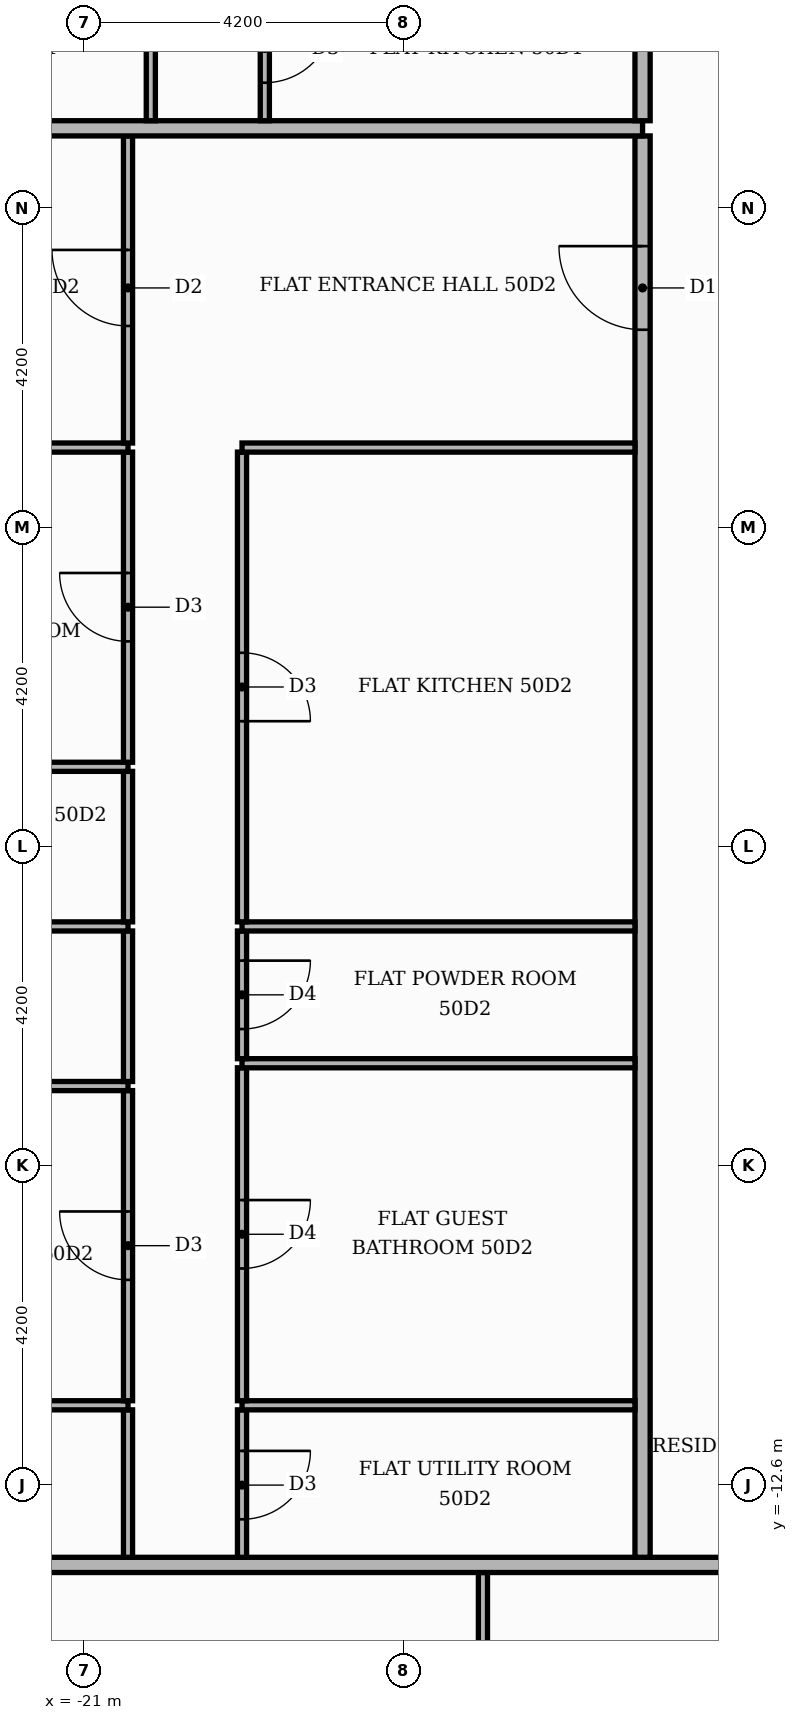
"""IFC4 building model, lengths in metres.
Left out: names, types, materials, properties, quantities, classifications, styles, units other than length and angle.
Written with IfcOpenShell. Run it as: python <this file> out.ifc"""

import sys

from ifc_helpers import new_model, si_unit, direction, frame, frame_2d, origin, place, context, subcontext, project, spatial, rectangle, extrude, element, fill, save


model = new_model("IFC4")
c1 = context("Model", 3, precision=1e-05, world=origin(), true_north=direction((0.0, 1.0)))
c2 = subcontext(c1, "Body", "Model", "MODEL_VIEW")
j1 = project(units=[si_unit("LENGTHUNIT", "METRE"), si_unit("PLANEANGLEUNIT", "RADIAN")], contexts=[c1])
p1 = place(None, origin())
s1 = spatial("IfcSite", under=j1, at=p1, CompositionType="ELEMENT")
p2 = place(p1, origin())
s2 = spatial("IfcBuilding", under=s1, at=p2, CompositionType="ELEMENT")
p3 = place(p2, frame((0.0, 0.0, 211.8)))
s3 = spatial("IfcBuildingStorey", under=s2, at=p3, CompositionType="ELEMENT", Elevation=211.8)
p4 = place(p3, frame((-15.75, -20.36, 0.0), z_axis=(0.0, 0.0, 1.0), x_axis=(0.0, 1.0, 0.0)))
e1 = element("IfcWall", 1, at=p4, inside=s3, PredefinedType="PARTITIONING", context=c2, shape_type="SweptSolid", body=[
    extrude(rectangle(XDim=6.61, YDim=0.12, at=frame_2d((3.305, 0.0))), origin(), (0.0, 0.0, 1.0), 3.48),
])
p5 = place(p4, frame((2.875, 0.0, 0.0)))
e2 = element("IfcOpeningElement", 2, at=p5, cuts=e1, PredefinedType="OPENING", context=c2, shape_type="SweptSolid", body=[
    extrude(rectangle(XDim=0.9, YDim=2.1, at=frame_2d((0.45, 1.05))), frame((0.0, 0.07, 0.0), z_axis=(0.0, -1.0, 0.0), x_axis=(1.0, 0.0, 0.0)), (0.0, 0.0, 1.0), 0.14),
])
p6 = place(p3, frame((-25.42, -13.65, 0.0), z_axis=(0.0, 0.0, 1.0), x_axis=(1.0, 0.0, 0.0)))
e3 = element("IfcWall", 3, at=p6, inside=s3, PredefinedType="PARTITIONING", context=c2, shape_type="SweptSolid", body=[
    extrude(rectangle(XDim=39.07, YDim=0.2, at=frame_2d((19.535, 0.0))), origin(), (0.0, 0.0, 1.0), 3.48),
])
p7 = place(p6, frame((13.32, 0.0, 0.0)))
e4 = element("IfcOpeningElement", 4, at=p7, cuts=e3, PredefinedType="OPENING", context=c2, shape_type="SweptSolid", body=[
    extrude(rectangle(XDim=1.1, YDim=2.4, at=frame_2d((0.55, 1.2))), frame((0.0, 0.11, 0.0), z_axis=(0.0, -1.0, 0.0), x_axis=(1.0, 0.0, 0.0)), (0.0, 0.0, 1.0), 0.22),
])
p8 = place(p3, frame((-20.42, -13.55, 0.0), z_axis=(0.0, 0.0, 1.0), x_axis=(0.0, 1.0, 0.0)))
e5 = element("IfcWall", 5, at=p8, inside=s3, PredefinedType="PARTITIONING", context=c2, shape_type="SweptSolid", body=[
    extrude(rectangle(XDim=1.94, YDim=0.12, at=frame_2d((0.97, 0.0))), origin(), (0.0, 0.0, 1.0), 3.48),
])
p9 = place(p3, frame((-18.92, -13.55, 0.0), z_axis=(0.0, 0.0, 1.0), x_axis=(0.0, 1.0, 0.0)))
e6 = element("IfcWall", 6, at=p9, inside=s3, PredefinedType="PARTITIONING", context=c2, shape_type="SweptSolid", body=[
    extrude(rectangle(XDim=1.94, YDim=0.12, at=frame_2d((0.97, 0.0))), origin(), (0.0, 0.0, 1.0), 3.48),
])
p10 = place(p9, frame((0.5, 0.0, 0.0)))
e7 = element("IfcOpeningElement", 7, at=p10, cuts=e6, PredefinedType="OPENING", context=c2, shape_type="SweptSolid", body=[
    extrude(rectangle(XDim=0.9, YDim=2.1, at=frame_2d((0.45, 1.05))), frame((0.0, 0.07, 0.0), z_axis=(0.0, -1.0, 0.0), x_axis=(1.0, 0.0, 0.0)), (0.0, 0.0, 1.0), 0.14),
])
p11 = place(p3, frame((-13.65, -13.55, 0.0), z_axis=(0.0, 0.0, 1.0), x_axis=(0.0, 1.0, 0.0)))
e8 = element("IfcWall", 8, at=p11, inside=s3, PredefinedType="PARTITIONING", context=c2, shape_type="SweptSolid", body=[
    extrude(rectangle(XDim=18.7, YDim=0.2, at=frame_2d((9.35, 0.0))), origin(), (0.0, 0.0, 1.0), 3.48),
])
p12 = place(p11, frame((16.15, 0.0, 0.0)))
e9 = element("IfcOpeningElement", 9, at=p12, cuts=e8, PredefinedType="OPENING", context=c2, shape_type="SweptSolid", body=[
    extrude(rectangle(XDim=1.1, YDim=2.4, at=frame_2d((0.55, 1.2))), frame((0.0, 0.11, 0.0), z_axis=(0.0, -1.0, 0.0), x_axis=(1.0, 0.0, 0.0)), (0.0, 0.0, 1.0), 0.22),
])
p13 = place(p3, frame((-25.42, -11.55, 0.0), z_axis=(0.0, 0.0, 1.0), x_axis=(1.0, 0.0, 0.0)))
e10 = element("IfcWall", 10, at=p13, inside=s3, PredefinedType="PARTITIONING", context=c2, shape_type="SweptSolid", body=[
    extrude(rectangle(XDim=5.0, YDim=0.12, at=frame_2d((2.5, 0.0))), origin(), (0.0, 0.0, 1.0), 3.48),
])
p14 = place(p13, frame((1.9, 0.0, 0.0)))
e11 = element("IfcOpeningElement", 11, at=p14, cuts=e10, PredefinedType="OPENING", context=c2, shape_type="SweptSolid", body=[
    extrude(rectangle(XDim=0.9, YDim=2.1, at=frame_2d((0.45, 1.05))), frame((0.0, 0.07, 0.0), z_axis=(0.0, -1.0, 0.0), x_axis=(1.0, 0.0, 0.0)), (0.0, 0.0, 1.0), 0.14),
])
p15 = place(p3, frame((-18.92, -11.55, 0.0), z_axis=(0.0, 0.0, 1.0), x_axis=(1.0, 0.0, 0.0)))
e12 = element("IfcWall", 12, at=p15, inside=s3, PredefinedType="PARTITIONING", context=c2, shape_type="SweptSolid", body=[
    extrude(rectangle(XDim=5.17, YDim=0.12, at=frame_2d((2.585, 0.0))), origin(), (0.0, 0.0, 1.0), 3.48),
])
p16 = place(p3, frame((-20.42, -11.49, 0.0), z_axis=(0.0, 0.0, 1.0), x_axis=(0.0, 1.0, 0.0)))
e13 = element("IfcWall", 13, at=p16, inside=s3, PredefinedType="PARTITIONING", context=c2, shape_type="SweptSolid", body=[
    extrude(rectangle(XDim=4.08, YDim=0.12, at=frame_2d((2.04, 0.0))), origin(), (0.0, 0.0, 1.0), 3.48),
])
p17 = place(p16, frame((1.59, 0.0, 0.0)))
e14 = element("IfcOpeningElement", 14, at=p17, cuts=e13, PredefinedType="OPENING", context=c2, shape_type="SweptSolid", body=[
    extrude(rectangle(XDim=0.9, YDim=2.1, at=frame_2d((0.45, 1.05))), frame((0.0, 0.07, 0.0), z_axis=(0.0, -1.0, 0.0), x_axis=(1.0, 0.0, 0.0)), (0.0, 0.0, 1.0), 0.14),
])
p18 = place(p3, frame((-18.92, -11.49, 0.0), z_axis=(0.0, 0.0, 1.0), x_axis=(0.0, 1.0, 0.0)))
e15 = element("IfcWall", 15, at=p18, inside=s3, PredefinedType="PARTITIONING", context=c2, shape_type="SweptSolid", body=[
    extrude(rectangle(XDim=4.38, YDim=0.12, at=frame_2d((2.19, 0.0))), origin(), (0.0, 0.0, 1.0), 3.48),
])
p19 = place(p18, frame((1.74, 0.0, 0.0)))
e16 = element("IfcOpeningElement", 16, at=p19, cuts=e15, PredefinedType="OPENING", context=c2, shape_type="SweptSolid", body=[
    extrude(rectangle(XDim=0.9, YDim=2.1, at=frame_2d((0.45, 1.05))), frame((0.0, 0.07, 0.0), z_axis=(0.0, -1.0, 0.0), x_axis=(1.0, 0.0, 0.0)), (0.0, 0.0, 1.0), 0.14),
])
p20 = place(p3, frame((-25.42, -7.35, 0.0), z_axis=(0.0, 0.0, 1.0), x_axis=(1.0, 0.0, 0.0)))
e17 = element("IfcWall", 17, at=p20, inside=s3, PredefinedType="PARTITIONING", context=c2, shape_type="SweptSolid", body=[
    extrude(rectangle(XDim=5.0, YDim=0.12, at=frame_2d((2.5, 0.0))), origin(), (0.0, 0.0, 1.0), 3.48),
])
p21 = place(p3, frame((-20.42, -7.29, 0.0), z_axis=(0.0, 0.0, 1.0), x_axis=(0.0, 1.0, 0.0)))
e18 = element("IfcWall", 18, at=p21, inside=s3, PredefinedType="PARTITIONING", context=c2, shape_type="SweptSolid", body=[
    extrude(rectangle(XDim=1.98, YDim=0.12, at=frame_2d((0.99, 0.0))), origin(), (0.0, 0.0, 1.0), 3.48),
])
p22 = place(p3, frame((-18.92, -7.05, 0.0), z_axis=(0.0, 0.0, 1.0), x_axis=(1.0, 0.0, 0.0)))
e19 = element("IfcWall", 19, at=p22, inside=s3, PredefinedType="PARTITIONING", context=c2, shape_type="SweptSolid", body=[
    extrude(rectangle(XDim=5.17, YDim=0.12, at=frame_2d((2.585, 0.0))), origin(), (0.0, 0.0, 1.0), 3.48),
])
p23 = place(p3, frame((-18.92, -6.99, 0.0), z_axis=(0.0, 0.0, 1.0), x_axis=(0.0, 1.0, 0.0)))
e20 = element("IfcWall", 20, at=p23, inside=s3, PredefinedType="PARTITIONING", context=c2, shape_type="SweptSolid", body=[
    extrude(rectangle(XDim=1.68, YDim=0.12, at=frame_2d((0.84, 0.0))), origin(), (0.0, 0.0, 1.0), 3.48),
])
p24 = place(p23, frame((0.39, 0.0, 0.0)))
e21 = element("IfcOpeningElement", 21, at=p24, cuts=e20, PredefinedType="OPENING", context=c2, shape_type="SweptSolid", body=[
    extrude(rectangle(XDim=0.9, YDim=2.1, at=frame_2d((0.45, 1.05))), frame((0.0, 0.07, 0.0), z_axis=(0.0, -1.0, 0.0), x_axis=(1.0, 0.0, 0.0)), (0.0, 0.0, 1.0), 0.14),
])
p25 = place(p3, frame((-25.42, -5.25, 0.0), z_axis=(0.0, 0.0, 1.0), x_axis=(1.0, 0.0, 0.0)))
e22 = element("IfcWall", 22, at=p25, inside=s3, PredefinedType="PARTITIONING", context=c2, shape_type="SweptSolid", body=[
    extrude(rectangle(XDim=5.0, YDim=0.12, at=frame_2d((2.5, 0.0))), origin(), (0.0, 0.0, 1.0), 3.48),
])
p26 = place(p25, frame((1.9, 0.0, 0.0)))
e23 = element("IfcOpeningElement", 23, at=p26, cuts=e22, PredefinedType="OPENING", context=c2, shape_type="SweptSolid", body=[
    extrude(rectangle(XDim=0.9, YDim=2.1, at=frame_2d((0.45, 1.05))), frame((0.0, 0.07, 0.0), z_axis=(0.0, -1.0, 0.0), x_axis=(1.0, 0.0, 0.0)), (0.0, 0.0, 1.0), 0.14),
])
p27 = place(p3, frame((-18.92, -5.25, 0.0), z_axis=(0.0, 0.0, 1.0), x_axis=(1.0, 0.0, 0.0)))
e24 = element("IfcWall", 24, at=p27, inside=s3, PredefinedType="PARTITIONING", context=c2, shape_type="SweptSolid", body=[
    extrude(rectangle(XDim=5.17, YDim=0.12, at=frame_2d((2.585, 0.0))), origin(), (0.0, 0.0, 1.0), 3.48),
])
p28 = place(p3, frame((-20.42, -5.19, 0.0), z_axis=(0.0, 0.0, 1.0), x_axis=(0.0, 1.0, 0.0)))
e25 = element("IfcWall", 25, at=p28, inside=s3, PredefinedType="PARTITIONING", context=c2, shape_type="SweptSolid", body=[
    extrude(rectangle(XDim=1.98, YDim=0.12, at=frame_2d((0.99, 0.0))), origin(), (0.0, 0.0, 1.0), 3.48),
])
p29 = place(p3, frame((-18.92, -5.19, 0.0), z_axis=(0.0, 0.0, 1.0), x_axis=(0.0, 1.0, 0.0)))
e26 = element("IfcWall", 26, at=p29, inside=s3, PredefinedType="PARTITIONING", context=c2, shape_type="SweptSolid", body=[
    extrude(rectangle(XDim=6.18, YDim=0.12, at=frame_2d((3.09, 0.0))), origin(), (0.0, 0.0, 1.0), 3.48),
])
p30 = place(p29, frame((2.64, 0.0, 0.0)))
e27 = element("IfcOpeningElement", 27, at=p30, cuts=e26, PredefinedType="OPENING", context=c2, shape_type="SweptSolid", body=[
    extrude(rectangle(XDim=0.9, YDim=2.1, at=frame_2d((0.45, 1.05))), frame((0.0, 0.07, 0.0), z_axis=(0.0, -1.0, 0.0), x_axis=(1.0, 0.0, 0.0)), (0.0, 0.0, 1.0), 0.14),
])
p31 = place(p3, frame((-25.42, -3.15, 0.0), z_axis=(0.0, 0.0, 1.0), x_axis=(1.0, 0.0, 0.0)))
e28 = element("IfcWall", 28, at=p31, inside=s3, PredefinedType="PARTITIONING", context=c2, shape_type="SweptSolid", body=[
    extrude(rectangle(XDim=5.0, YDim=0.12, at=frame_2d((2.5, 0.0))), origin(), (0.0, 0.0, 1.0), 3.48),
])
p32 = place(p31, frame((1.9, 0.0, 0.0)))
e29 = element("IfcOpeningElement", 29, at=p32, cuts=e28, PredefinedType="OPENING", context=c2, shape_type="SweptSolid", body=[
    extrude(rectangle(XDim=0.9, YDim=2.1, at=frame_2d((0.45, 1.05))), frame((0.0, 0.07, 0.0), z_axis=(0.0, -1.0, 0.0), x_axis=(1.0, 0.0, 0.0)), (0.0, 0.0, 1.0), 0.14),
])
p33 = place(p3, frame((-20.42, -3.09, 0.0), z_axis=(0.0, 0.0, 1.0), x_axis=(0.0, 1.0, 0.0)))
e30 = element("IfcWall", 30, at=p33, inside=s3, PredefinedType="PARTITIONING", context=c2, shape_type="SweptSolid", body=[
    extrude(rectangle(XDim=4.08, YDim=0.12, at=frame_2d((2.04, 0.0))), origin(), (0.0, 0.0, 1.0), 3.48),
])
p34 = place(p33, frame((1.59, 0.0, 0.0)))
e31 = element("IfcOpeningElement", 31, at=p34, cuts=e30, PredefinedType="OPENING", context=c2, shape_type="SweptSolid", body=[
    extrude(rectangle(XDim=0.9, YDim=2.1, at=frame_2d((0.45, 1.05))), frame((0.0, 0.07, 0.0), z_axis=(0.0, -1.0, 0.0), x_axis=(1.0, 0.0, 0.0)), (0.0, 0.0, 1.0), 0.14),
])
p35 = place(p3, frame((-25.42, 1.05, 0.0), z_axis=(0.0, 0.0, 1.0), x_axis=(1.0, 0.0, 0.0)))
e32 = element("IfcWall", 32, at=p35, inside=s3, PredefinedType="PARTITIONING", context=c2, shape_type="SweptSolid", body=[
    extrude(rectangle(XDim=5.0, YDim=0.12, at=frame_2d((2.5, 0.0))), origin(), (0.0, 0.0, 1.0), 3.48),
])
p36 = place(p3, frame((-18.92, 1.05, 0.0), z_axis=(0.0, 0.0, 1.0), x_axis=(1.0, 0.0, 0.0)))
e33 = element("IfcWall", 33, at=p36, inside=s3, PredefinedType="PARTITIONING", context=c2, shape_type="SweptSolid", body=[
    extrude(rectangle(XDim=5.17, YDim=0.12, at=frame_2d((2.585, 0.0))), origin(), (0.0, 0.0, 1.0), 3.48),
])
p37 = place(p3, frame((-20.42, 1.11, 0.0), z_axis=(0.0, 0.0, 1.0), x_axis=(0.0, 1.0, 0.0)))
e34 = element("IfcWall", 34, at=p37, inside=s3, PredefinedType="PARTITIONING", context=c2, shape_type="SweptSolid", body=[
    extrude(rectangle(XDim=4.04, YDim=0.12, at=frame_2d((2.02, 0.0))), origin(), (0.0, 0.0, 1.0), 3.48),
])
p38 = place(p37, frame((1.54, 0.0, 0.0)))
e35 = element("IfcOpeningElement", 35, at=p38, cuts=e34, PredefinedType="OPENING", context=c2, shape_type="SweptSolid", body=[
    extrude(rectangle(XDim=1.0, YDim=2.1, at=frame_2d((0.5, 1.05))), frame((0.0, 0.07, 0.0), z_axis=(0.0, -1.0, 0.0), x_axis=(1.0, 0.0, 0.0)), (0.0, 0.0, 1.0), 0.14),
])
p39 = place(p3, frame((-25.42, 5.25, 0.0), z_axis=(0.0, 0.0, 1.0), x_axis=(1.0, 0.0, 0.0)))
e36 = element("IfcWall", 36, at=p39, inside=s3, PredefinedType="PARTITIONING", context=c2, shape_type="SweptSolid", body=[
    extrude(rectangle(XDim=11.77, YDim=0.2, at=frame_2d((5.885, 0.0))), origin(), (0.0, 0.0, 1.0), 3.48),
])
p40 = place(p3, frame((-20.12, 5.35, 0.0), z_axis=(0.0, 0.0, 1.0), x_axis=(0.0, 1.0, 0.0)))
e37 = element("IfcWall", 37, at=p40, inside=s3, PredefinedType="PARTITIONING", context=c2, shape_type="SweptSolid", body=[
    extrude(rectangle(XDim=1.94, YDim=0.12, at=frame_2d((0.97, 0.0))), origin(), (0.0, 0.0, 1.0), 3.48),
])
p41 = place(p3, frame((-18.62, 5.35, 0.0), z_axis=(0.0, 0.0, 1.0), x_axis=(0.0, 1.0, 0.0)))
e38 = element("IfcWall", 38, at=p41, inside=s3, PredefinedType="PARTITIONING", context=c2, shape_type="SweptSolid", body=[
    extrude(rectangle(XDim=1.94, YDim=0.12, at=frame_2d((0.97, 0.0))), origin(), (0.0, 0.0, 1.0), 3.48),
])
p42 = place(p41, frame((0.5, 0.0, 0.0)))
e39 = element("IfcOpeningElement", 39, at=p42, cuts=e38, PredefinedType="OPENING", context=c2, shape_type="SweptSolid", body=[
    extrude(rectangle(XDim=0.9, YDim=2.1, at=frame_2d((0.45, 1.05))), frame((0.0, 0.07, 0.0), z_axis=(0.0, -1.0, 0.0), x_axis=(1.0, 0.0, 0.0)), (0.0, 0.0, 1.0), 0.14),
])
p43 = place(p3, frame((-13.65, 5.35, 0.0), z_axis=(0.0, 0.0, 1.0), x_axis=(0.0, 1.0, 0.0)))
e40 = element("IfcWall", 40, at=p43, inside=s3, PredefinedType="PARTITIONING", context=c2, shape_type="SweptSolid", body=[
    extrude(rectangle(XDim=8.2, YDim=0.2, at=frame_2d((4.1, 0.0))), origin(), (0.0, 0.0, 1.0), 3.48),
])
p44 = place(p43, frame((5.65, 0.0, 0.0)))
e41 = element("IfcOpeningElement", 41, at=p44, cuts=e40, PredefinedType="OPENING", context=c2, shape_type="SweptSolid", body=[
    extrude(rectangle(XDim=1.1, YDim=2.4, at=frame_2d((0.55, 1.2))), frame((0.0, 0.11, 0.0), z_axis=(0.0, -1.0, 0.0), x_axis=(1.0, 0.0, 0.0)), (0.0, 0.0, 1.0), 0.22),
])
p45 = place(p42, frame((0.9, 0.0, 0.0), z_axis=(0.0, 0.0, 1.0), x_axis=(-1.0, 0.0, 0.0)))
e42 = element("IfcDoor", 42, at=p45, inside=s3, OperationType="SINGLE_SWING_RIGHT", PredefinedType="DOOR", context=c2, shape_type="SweptSolid", body=[
    extrude(rectangle(XDim=0.9, YDim=2.1, at=frame_2d((0.45, 1.05))), frame((0.0, 0.025, 0.0), z_axis=(0.0, -1.0, 0.0), x_axis=(1.0, 0.0, 0.0)), (0.0, 0.0, 1.0), 0.05),
])
fill(e39, e42)
p46 = place(p12, origin())
e43 = element("IfcDoor", 43, at=p46, inside=s3, OperationType="SINGLE_SWING_RIGHT", PredefinedType="DOOR", context=c2, shape_type="SweptSolid", body=[
    extrude(rectangle(XDim=1.1, YDim=2.4, at=frame_2d((0.55, 1.2))), frame((0.0, 0.025, 0.0), z_axis=(0.0, -1.0, 0.0), x_axis=(1.0, 0.0, 0.0)), (0.0, 0.0, 1.0), 0.05),
])
fill(e9, e43)
p47 = place(p30, frame((0.9, 0.0, 0.0), z_axis=(0.0, 0.0, 1.0), x_axis=(-1.0, 0.0, 0.0)))
e44 = element("IfcDoor", 44, at=p47, inside=s3, OperationType="SINGLE_SWING_LEFT", PredefinedType="DOOR", context=c2, shape_type="SweptSolid", body=[
    extrude(rectangle(XDim=0.9, YDim=2.1, at=frame_2d((0.45, 1.05))), frame((0.0, 0.025, 0.0), z_axis=(0.0, -1.0, 0.0), x_axis=(1.0, 0.0, 0.0)), (0.0, 0.0, 1.0), 0.05),
])
fill(e27, e44)
p48 = place(p24, frame((0.9, 0.0, 0.0), z_axis=(0.0, 0.0, 1.0), x_axis=(-1.0, 0.0, 0.0)))
e45 = element("IfcDoor", 45, at=p48, inside=s3, OperationType="SINGLE_SWING_RIGHT", PredefinedType="DOOR", context=c2, shape_type="SweptSolid", body=[
    extrude(rectangle(XDim=0.9, YDim=2.1, at=frame_2d((0.45, 1.05))), frame((0.0, 0.025, 0.0), z_axis=(0.0, -1.0, 0.0), x_axis=(1.0, 0.0, 0.0)), (0.0, 0.0, 1.0), 0.05),
])
fill(e21, e45)
p49 = place(p19, frame((0.9, 0.0, 0.0), z_axis=(0.0, 0.0, 1.0), x_axis=(-1.0, 0.0, 0.0)))
e46 = element("IfcDoor", 46, at=p49, inside=s3, OperationType="SINGLE_SWING_RIGHT", PredefinedType="DOOR", context=c2, shape_type="SweptSolid", body=[
    extrude(rectangle(XDim=0.9, YDim=2.1, at=frame_2d((0.45, 1.05))), frame((0.0, 0.025, 0.0), z_axis=(0.0, -1.0, 0.0), x_axis=(1.0, 0.0, 0.0)), (0.0, 0.0, 1.0), 0.05),
])
fill(e16, e46)
p50 = place(p10, frame((0.9, 0.0, 0.0), z_axis=(0.0, 0.0, 1.0), x_axis=(-1.0, 0.0, 0.0)))
e47 = element("IfcDoor", 47, at=p50, inside=s3, OperationType="SINGLE_SWING_RIGHT", PredefinedType="DOOR", context=c2, shape_type="SweptSolid", body=[
    extrude(rectangle(XDim=0.9, YDim=2.1, at=frame_2d((0.45, 1.05))), frame((0.0, 0.025, 0.0), z_axis=(0.0, -1.0, 0.0), x_axis=(1.0, 0.0, 0.0)), (0.0, 0.0, 1.0), 0.05),
])
fill(e7, e47)
p51 = place(p38, origin())
e48 = element("IfcDoor", 48, at=p51, inside=s3, OperationType="SINGLE_SWING_RIGHT", PredefinedType="DOOR", context=c2, shape_type="SweptSolid", body=[
    extrude(rectangle(XDim=1.0, YDim=2.1, at=frame_2d((0.5, 1.05))), frame((0.0, 0.025, 0.0), z_axis=(0.0, -1.0, 0.0), x_axis=(1.0, 0.0, 0.0)), (0.0, 0.0, 1.0), 0.05),
])
fill(e35, e48)
p52 = place(p34, origin())
e49 = element("IfcDoor", 49, at=p52, inside=s3, OperationType="SINGLE_SWING_RIGHT", PredefinedType="DOOR", context=c2, shape_type="SweptSolid", body=[
    extrude(rectangle(XDim=0.9, YDim=2.1, at=frame_2d((0.45, 1.05))), frame((0.0, 0.025, 0.0), z_axis=(0.0, -1.0, 0.0), x_axis=(1.0, 0.0, 0.0)), (0.0, 0.0, 1.0), 0.05),
])
fill(e31, e49)
p53 = place(p17, origin())
e50 = element("IfcDoor", 50, at=p53, inside=s3, OperationType="SINGLE_SWING_RIGHT", PredefinedType="DOOR", context=c2, shape_type="SweptSolid", body=[
    extrude(rectangle(XDim=0.9, YDim=2.1, at=frame_2d((0.45, 1.05))), frame((0.0, 0.025, 0.0), z_axis=(0.0, -1.0, 0.0), x_axis=(1.0, 0.0, 0.0)), (0.0, 0.0, 1.0), 0.05),
])
fill(e14, e50)
save(model, sys.argv[1])
